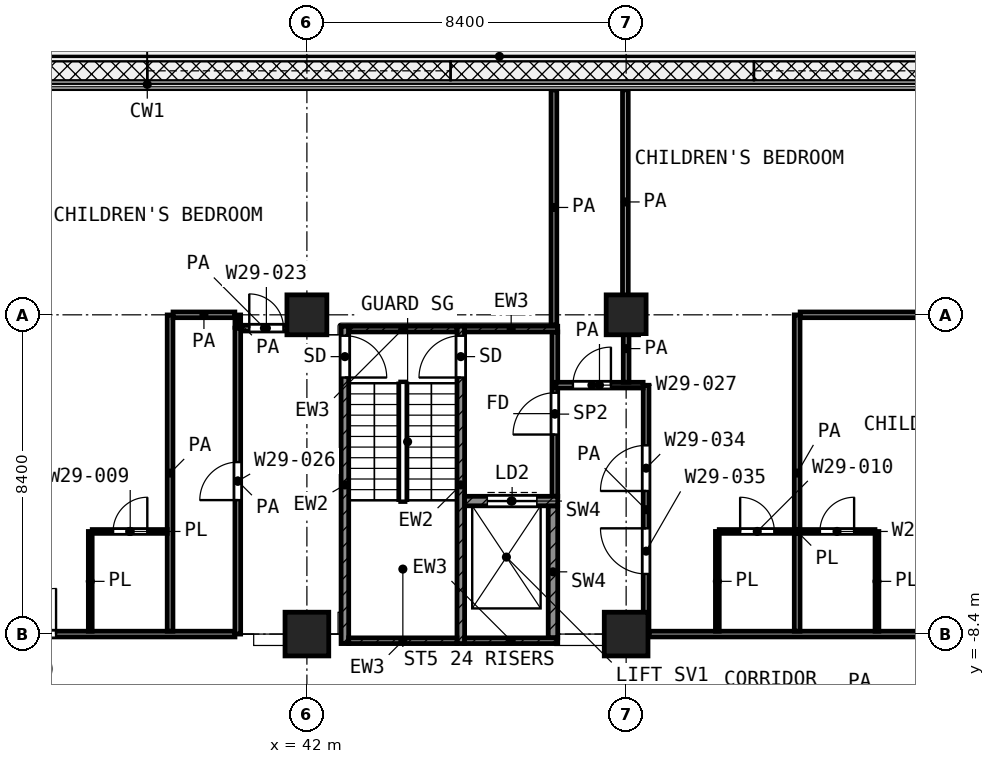
"""IFC4 building model, lengths in metres.
Left out: names, types, materials, properties, quantities, classifications, styles, units other than length and angle.
Written with IfcOpenShell. Run it as: python <this file> out.ifc"""

import sys

from ifc_helpers import new_model, si_unit, direction, frame, frame_2d, origin, origin_2d, place, context, subcontext, project, spatial, rectangle, extrude, element, fill, save


model = new_model("IFC4")
c1 = context("Model", 3, precision=1e-05, world=origin(), true_north=direction((0.0, 1.0)))
c2 = subcontext(c1, "Body", "Model", "MODEL_VIEW")
j1 = project(units=[si_unit("LENGTHUNIT", "METRE"), si_unit("PLANEANGLEUNIT", "RADIAN")], contexts=[c1])
p1 = place(None, origin())
s1 = spatial("IfcSite", under=j1, at=p1, CompositionType="ELEMENT")
p2 = place(p1, origin())
s2 = spatial("IfcBuilding", under=s1, at=p2, CompositionType="ELEMENT")
p3 = place(p2, frame((0.0, 0.0, 149.2)))
s3 = spatial("IfcBuildingStorey", under=s2, at=p3, CompositionType="ELEMENT", Elevation=149.2)
for number, where, z_axis, x_axis in (
    (1, (42.0, 0.0, 0.0), (0.0, 0.0, 1.0), (1.0, 0.0, 0.0)),
    (2, (50.4, 0.0, 0.0), (0.0, 0.0, 1.0), (1.0, 0.0, 0.0)),
):
    element("IfcColumn", number, at=place(p3, frame(where, z_axis=z_axis, x_axis=x_axis)), inside=s3, PredefinedType="COLUMN", context=c2, shape_type="SweptSolid", body=[
        extrude(rectangle(XDim=1.05, YDim=1.05, at=origin_2d()), origin(), (0.0, 0.0, 1.0), 4.2),
    ])
for number, where, z_axis, x_axis in (
    (3, (42.0, -8.4, 0.0), (0.0, 0.0, 1.0), (1.0, 0.0, 0.0)),
    (4, (50.4, -8.4, 0.0), (0.0, 0.0, 1.0), (1.0, 0.0, 0.0)),
):
    element("IfcColumn", number, at=place(p3, frame(where, z_axis=z_axis, x_axis=x_axis)), inside=s3, PredefinedType="COLUMN", context=c2, shape_type="SweptSolid", body=[
        extrude(rectangle(XDim=1.15, YDim=1.15, at=origin_2d()), origin(), (0.0, 0.0, 1.0), 4.2),
    ])
p4 = place(p3, frame((43.0, -8.65, 0.0), z_axis=(0.0, 0.0, 1.0), x_axis=(0.0, 1.0, 0.0)))
e5 = element("IfcWall", 5, at=p4, inside=s3, PredefinedType="SHEAR", context=c2, shape_type="SweptSolid", body=[
    extrude(rectangle(XDim=8.35, YDim=0.2, at=frame_2d((4.175, 0.0))), origin(), (0.0, 0.0, 1.0), 3.7),
])
p5 = place(p4, frame((7.0, 0.0, 0.0)))
e6 = element("IfcOpeningElement", 6, at=p5, cuts=e5, PredefinedType="OPENING", context=c2, shape_type="SweptSolid", body=[
    extrude(rectangle(XDim=1.1, YDim=2.1, at=frame_2d((0.55, 1.05))), frame((0.0, 0.11, 0.0), z_axis=(0.0, -1.0, 0.0), x_axis=(1.0, 0.0, 0.0)), (0.0, 0.0, 1.0), 0.22),
])
p6 = place(p3, frame((46.05, -8.65, 0.0), z_axis=(0.0, 0.0, 1.0), x_axis=(0.0, 1.0, 0.0)))
e7 = element("IfcWall", 7, at=p6, inside=s3, PredefinedType="SHEAR", context=c2, shape_type="SweptSolid", body=[
    extrude(rectangle(XDim=8.35, YDim=0.2, at=frame_2d((4.175, 0.0))), origin(), (0.0, 0.0, 1.0), 3.7),
])
p7 = place(p6, frame((7.0, 0.0, 0.0)))
e8 = element("IfcOpeningElement", 8, at=p7, cuts=e7, PredefinedType="OPENING", context=c2, shape_type="SweptSolid", body=[
    extrude(rectangle(XDim=1.1, YDim=2.1, at=frame_2d((0.55, 1.05))), frame((0.0, 0.11, 0.0), z_axis=(0.0, -1.0, 0.0), x_axis=(1.0, 0.0, 0.0)), (0.0, 0.0, 1.0), 0.22),
])
p8 = place(p3, frame((43.1, -0.375, 0.0), z_axis=(0.0, 0.0, 1.0), x_axis=(1.0, 0.0, 0.0)))
e9 = element("IfcWall", 9, at=p8, inside=s3, PredefinedType="SHEAR", context=c2, shape_type="SweptSolid", body=[
    extrude(rectangle(XDim=2.85, YDim=0.15, at=frame_2d((1.425, 0.0))), origin(), (0.0, 0.0, 1.0), 3.7),
])
p9 = place(p3, frame((46.15, -0.375, 0.0), z_axis=(0.0, 0.0, 1.0), x_axis=(1.0, 0.0, 0.0)))
e10 = element("IfcWall", 10, at=p9, inside=s3, PredefinedType="SHEAR", context=c2, shape_type="SweptSolid", body=[
    extrude(rectangle(XDim=2.45, YDim=0.15, at=frame_2d((1.225, 0.0))), origin(), (0.0, 0.0, 1.0), 3.7),
])
p10 = place(p3, frame((43.1, -8.575, 0.0), z_axis=(0.0, 0.0, 1.0), x_axis=(1.0, 0.0, 0.0)))
e11 = element("IfcWall", 11, at=p10, inside=s3, PredefinedType="SHEAR", context=c2, shape_type="SweptSolid", body=[
    extrude(rectangle(XDim=2.85, YDim=0.15, at=frame_2d((1.425, 0.0))), origin(), (0.0, 0.0, 1.0), 3.7),
])
p11 = place(p3, frame((46.15, -8.575, 0.0), z_axis=(0.0, 0.0, 1.0), x_axis=(1.0, 0.0, 0.0)))
e12 = element("IfcWall", 12, at=p11, inside=s3, PredefinedType="SHEAR", context=c2, shape_type="SweptSolid", body=[
    extrude(rectangle(XDim=2.45, YDim=0.15, at=frame_2d((1.225, 0.0))), origin(), (0.0, 0.0, 1.0), 3.7),
])
p12 = place(p3, frame((46.15, -4.9, 0.0), z_axis=(0.0, 0.0, 1.0), x_axis=(1.0, 0.0, 0.0)))
e13 = element("IfcWall", 13, at=p12, inside=s3, PredefinedType="SHEAR", context=c2, shape_type="SweptSolid", body=[
    extrude(rectangle(XDim=2.45, YDim=0.25, at=frame_2d((1.225, 0.0))), origin(), (0.0, 0.0, 1.0), 3.7),
])
p13 = place(p12, frame((0.6, 0.0, 0.0)))
e14 = element("IfcOpeningElement", 14, at=p13, cuts=e13, PredefinedType="OPENING", context=c2, shape_type="SweptSolid", body=[
    extrude(rectangle(XDim=1.3, YDim=2.1, at=frame_2d((0.65, 1.05))), frame((0.0, 0.135, 0.0), z_axis=(0.0, -1.0, 0.0), x_axis=(1.0, 0.0, 0.0)), (0.0, 0.0, 1.0), 0.27),
])
p14 = place(p3, frame((48.475, -8.5, 0.0), z_axis=(0.0, 0.0, 1.0), x_axis=(0.0, 1.0, 0.0)))
e15 = element("IfcWall", 15, at=p14, inside=s3, PredefinedType="SHEAR", context=c2, shape_type="SweptSolid", body=[
    extrude(rectangle(XDim=3.475, YDim=0.25, at=frame_2d((1.738, 0.0))), origin(), (0.0, 0.0, 1.0), 3.7),
])
p15 = place(p3, frame((48.525, -4.775, 0.0), z_axis=(0.0, 0.0, 1.0), x_axis=(0.0, 1.0, 0.0)))
e16 = element("IfcWall", 16, at=p15, inside=s3, PredefinedType="PARTITIONING", context=c2, shape_type="SweptSolid", body=[
    extrude(rectangle(XDim=4.325, YDim=0.15, at=frame_2d((2.163, 0.0))), origin(), (0.0, 0.0, 1.0), 3.7),
])
p16 = place(p15, frame((1.625, 0.0, 0.0)))
e17 = element("IfcOpeningElement", 17, at=p16, cuts=e16, PredefinedType="OPENING", context=c2, shape_type="SweptSolid", body=[
    extrude(rectangle(XDim=1.1, YDim=2.1, at=frame_2d((0.55, 1.05))), frame((0.0, 0.085, 0.0), z_axis=(0.0, -1.0, 0.0), x_axis=(1.0, 0.0, 0.0)), (0.0, 0.0, 1.0), 0.17),
])
p17 = place(p3, frame((36.352, -5.7, 0.0), z_axis=(0.0, 0.0, 1.0), x_axis=(1.0, 0.0, 0.0)))
e18 = element("IfcWall", 18, at=p17, inside=s3, PredefinedType="PARTITIONING", context=c2, shape_type="SweptSolid", body=[
    extrude(rectangle(XDim=1.973, YDim=0.1, at=frame_2d((0.986, 0.0))), origin(), (0.0, 0.0, 1.0), 3.7),
])
p18 = place(p17, frame((0.549, 0.0, 0.0)))
e19 = element("IfcOpeningElement", 19, at=p18, cuts=e18, PredefinedType="OPENING", context=c2, shape_type="SweptSolid", body=[
    extrude(rectangle(XDim=0.9, YDim=2.1, at=frame_2d((0.45, 1.05))), frame((0.0, 0.06, 0.0), z_axis=(0.0, -1.0, 0.0), x_axis=(1.0, 0.0, 0.0)), (0.0, 0.0, 1.0), 0.12),
])
p19 = place(p3, frame((52.85, -5.7, 0.0), z_axis=(0.0, 0.0, 1.0), x_axis=(1.0, 0.0, 0.0)))
e20 = element("IfcWall", 20, at=p19, inside=s3, PredefinedType="PARTITIONING", context=c2, shape_type="SweptSolid", body=[
    extrude(rectangle(XDim=4.098, YDim=0.1, at=frame_2d((2.049, 0.0))), origin(), (0.0, 0.0, 1.0), 3.7),
])
p20 = place(p19, frame((0.55, 0.0, 0.0)))
e21 = element("IfcOpeningElement", 21, at=p20, cuts=e20, PredefinedType="OPENING", context=c2, shape_type="SweptSolid", body=[
    extrude(rectangle(XDim=0.9, YDim=2.1, at=frame_2d((0.45, 1.05))), frame((0.0, 0.06, 0.0), z_axis=(0.0, -1.0, 0.0), x_axis=(1.0, 0.0, 0.0)), (0.0, 0.0, 1.0), 0.12),
])
p21 = place(p19, frame((2.649, 0.0, 0.0)))
e22 = element("IfcOpeningElement", 22, at=p21, cuts=e20, PredefinedType="OPENING", context=c2, shape_type="SweptSolid", body=[
    extrude(rectangle(XDim=0.9, YDim=2.1, at=frame_2d((0.45, 1.05))), frame((0.0, 0.06, 0.0), z_axis=(0.0, -1.0, 0.0), x_axis=(1.0, 0.0, 0.0)), (0.0, 0.0, 1.0), 0.12),
])
p22 = place(p3, frame((36.3, -8.325, 0.0), z_axis=(0.0, 0.0, 1.0), x_axis=(0.0, 1.0, 0.0)))
e23 = element("IfcWall", 23, at=p22, inside=s3, PredefinedType="PARTITIONING", context=c2, shape_type="SweptSolid", body=[
    extrude(rectangle(XDim=2.624, YDim=0.1, at=frame_2d((1.312, 0.0))), origin(), (0.0, 0.0, 1.0), 3.7),
])
p23 = place(p3, frame((52.8, -8.325, 0.0), z_axis=(0.0, 0.0, 1.0), x_axis=(0.0, 1.0, 0.0)))
e24 = element("IfcWall", 24, at=p23, inside=s3, PredefinedType="PARTITIONING", context=c2, shape_type="SweptSolid", body=[
    extrude(rectangle(XDim=2.625, YDim=0.1, at=frame_2d((1.312, 0.0))), origin(), (0.0, 0.0, 1.0), 3.7),
])
p24 = place(p3, frame((57.0, -8.325, 0.0), z_axis=(0.0, 0.0, 1.0), x_axis=(0.0, 1.0, 0.0)))
e25 = element("IfcWall", 25, at=p24, inside=s3, PredefinedType="PARTITIONING", context=c2, shape_type="SweptSolid", body=[
    extrude(rectangle(XDim=2.624, YDim=0.1, at=frame_2d((1.312, 0.0))), origin(), (0.0, 0.0, 1.0), 3.7),
])
p25 = place(p3, frame((25.0, -8.4, 0.0), z_axis=(0.0, 0.0, 1.0), x_axis=(1.0, 0.0, 0.0)))
e26 = element("IfcWall", 26, at=p25, inside=s3, PredefinedType="PARTITIONING", context=c2, shape_type="SweptSolid", body=[
    extrude(rectangle(XDim=15.107, YDim=0.15, at=frame_2d((7.553, 0.0))), origin(), (0.0, 0.0, 1.0), 3.7),
])
p26 = place(p25, frame((3.65, 0.0, 0.0)))
e27 = element("IfcOpeningElement", 27, at=p26, cuts=e26, PredefinedType="OPENING", context=c2, shape_type="SweptSolid", body=[
    extrude(rectangle(XDim=1.5, YDim=2.1, at=frame_2d((0.75, 1.05))), frame((0.0, 0.085, 0.0), z_axis=(0.0, -1.0, 0.0), x_axis=(1.0, 0.0, 0.0)), (0.0, 0.0, 1.0), 0.17),
])
p27 = place(p25, frame((9.2, 0.0, 0.0)))
e28 = element("IfcOpeningElement", 28, at=p27, cuts=e26, PredefinedType="OPENING", context=c2, shape_type="SweptSolid", body=[
    extrude(rectangle(XDim=1.2, YDim=2.1, at=frame_2d((0.6, 1.05))), frame((0.0, 0.085, 0.0), z_axis=(0.0, -1.0, 0.0), x_axis=(1.0, 0.0, 0.0)), (0.0, 0.0, 1.0), 0.17),
])
p28 = place(p3, frame((51.0, -8.4, 0.0), z_axis=(0.0, 0.0, 1.0), x_axis=(1.0, 0.0, 0.0)))
e29 = element("IfcWall", 29, at=p28, inside=s3, PredefinedType="PARTITIONING", context=c2, shape_type="SweptSolid", body=[
    extrude(rectangle(XDim=24.52, YDim=0.15, at=frame_2d((12.26, 0.0))), origin(), (0.0, 0.0, 1.0), 3.7),
])
p29 = place(p28, frame((8.4, 0.0, 0.0)))
e30 = element("IfcOpeningElement", 30, at=p29, cuts=e29, PredefinedType="OPENING", context=c2, shape_type="SweptSolid", body=[
    extrude(rectangle(XDim=1.2, YDim=2.1, at=frame_2d((0.6, 1.05))), frame((0.0, 0.085, 0.0), z_axis=(0.0, -1.0, 0.0), x_axis=(1.0, 0.0, 0.0)), (0.0, 0.0, 1.0), 0.17),
])
p30 = place(p28, frame((10.0, 0.0, 0.0)))
e31 = element("IfcOpeningElement", 31, at=p30, cuts=e29, PredefinedType="OPENING", context=c2, shape_type="SweptSolid", body=[
    extrude(rectangle(XDim=1.2, YDim=2.1, at=frame_2d((0.6, 1.05))), frame((0.0, 0.085, 0.0), z_axis=(0.0, -1.0, 0.0), x_axis=(1.0, 0.0, 0.0)), (0.0, 0.0, 1.0), 0.17),
])
p31 = place(p28, frame((13.8, 0.0, 0.0)))
e32 = element("IfcOpeningElement", 32, at=p31, cuts=e29, PredefinedType="OPENING", context=c2, shape_type="SweptSolid", body=[
    extrude(rectangle(XDim=1.2, YDim=2.1, at=frame_2d((0.6, 1.05))), frame((0.0, 0.085, 0.0), z_axis=(0.0, -1.0, 0.0), x_axis=(1.0, 0.0, 0.0)), (0.0, 0.0, 1.0), 0.17),
])
p32 = place(p28, frame((16.8, 0.0, 0.0)))
e33 = element("IfcOpeningElement", 33, at=p32, cuts=e29, PredefinedType="OPENING", context=c2, shape_type="SweptSolid", body=[
    extrude(rectangle(XDim=1.2, YDim=2.1, at=frame_2d((0.6, 1.05))), frame((0.0, 0.085, 0.0), z_axis=(0.0, -1.0, 0.0), x_axis=(1.0, 0.0, 0.0)), (0.0, 0.0, 1.0), 0.17),
])
p33 = place(p28, frame((22.0, 0.0, 0.0)))
e34 = element("IfcOpeningElement", 34, at=p33, cuts=e29, PredefinedType="OPENING", context=c2, shape_type="SweptSolid", body=[
    extrude(rectangle(XDim=1.0, YDim=2.1, at=frame_2d((0.5, 1.05))), frame((0.0, 0.085, 0.0), z_axis=(0.0, -1.0, 0.0), x_axis=(1.0, 0.0, 0.0)), (0.0, 0.0, 1.0), 0.17),
])
p34 = place(p3, frame((48.55, -1.85, 0.0), z_axis=(0.0, 0.0, 1.0), x_axis=(1.0, 0.0, 0.0)))
e35 = element("IfcWall", 35, at=p34, inside=s3, PredefinedType="PARTITIONING", context=c2, shape_type="SweptSolid", body=[
    extrude(rectangle(XDim=2.297, YDim=0.15, at=frame_2d((1.148, 0.0))), origin(), (0.0, 0.0, 1.0), 3.7),
])
p35 = place(p34, frame((0.45, 0.0, 0.0)))
e36 = element("IfcOpeningElement", 36, at=p35, cuts=e35, PredefinedType="OPENING", context=c2, shape_type="SweptSolid", body=[
    extrude(rectangle(XDim=1.0, YDim=2.1, at=frame_2d((0.5, 1.05))), frame((0.0, 0.085, 0.0), z_axis=(0.0, -1.0, 0.0), x_axis=(1.0, 0.0, 0.0)), (0.0, 0.0, 1.0), 0.17),
])
p36 = place(p3, frame((40.277, -0.35, 0.0), z_axis=(0.0, 0.0, 1.0), x_axis=(1.0, 0.0, 0.0)))
e37 = element("IfcWall", 37, at=p36, inside=s3, PredefinedType="PARTITIONING", context=c2, shape_type="SweptSolid", body=[
    extrude(rectangle(XDim=1.211, YDim=0.15, at=frame_2d((0.605, 0.0))), origin(), (0.0, 0.0, 1.0), 3.7),
])
p37 = place(p36, frame((0.207, 0.0, 0.0)))
e38 = element("IfcOpeningElement", 38, at=p37, cuts=e37, PredefinedType="OPENING", context=c2, shape_type="SweptSolid", body=[
    extrude(rectangle(XDim=0.9, YDim=2.1, at=frame_2d((0.45, 1.05))), frame((0.0, 0.085, 0.0), z_axis=(0.0, -1.0, 0.0), x_axis=(1.0, 0.0, 0.0)), (0.0, 0.0, 1.0), 0.17),
])
p38 = place(p3, frame((38.478, 0.0, 0.0), z_axis=(0.0, 0.0, 1.0), x_axis=(1.0, 0.0, 0.0)))
e39 = element("IfcWall", 39, at=p38, inside=s3, PredefinedType="PARTITIONING", context=c2, shape_type="SweptSolid", body=[
    extrude(rectangle(XDim=1.626, YDim=0.15, at=frame_2d((0.813, 0.0))), origin(), (0.0, 0.0, 1.0), 3.7),
])
p39 = place(p3, frame((54.979, 0.0, 0.0), z_axis=(0.0, 0.0, 1.0), x_axis=(1.0, 0.0, 0.0)))
e40 = element("IfcWall", 40, at=p39, inside=s3, PredefinedType="PARTITIONING", context=c2, shape_type="SweptSolid", body=[
    extrude(rectangle(XDim=7.346, YDim=0.15, at=frame_2d((3.673, 0.0))), origin(), (0.0, 0.0, 1.0), 3.7),
])
p40 = place(p3, frame((38.4, -8.325, 0.0), z_axis=(0.0, 0.0, 1.0), x_axis=(0.0, 1.0, 0.0)))
e41 = element("IfcWall", 41, at=p40, inside=s3, PredefinedType="PARTITIONING", context=c2, shape_type="SweptSolid", body=[
    extrude(rectangle(XDim=8.322, YDim=0.15, at=frame_2d((4.161, 0.0))), origin(), (0.0, 0.0, 1.0), 3.7),
])
p41 = place(p3, frame((40.182, -8.4, 0.0), z_axis=(0.0, 0.0, 1.0), x_axis=(0.0, 1.0, 0.0)))
e42 = element("IfcWall", 42, at=p41, inside=s3, PredefinedType="PARTITIONING", context=c2, shape_type="SweptSolid", body=[
    extrude(rectangle(XDim=8.05, YDim=0.15, at=frame_2d((4.025, 0.0))), origin(), (0.0, 0.0, 1.0), 3.7),
])
p42 = place(p41, frame((3.525, 0.0, 0.0)))
e43 = element("IfcOpeningElement", 43, at=p42, cuts=e42, PredefinedType="OPENING", context=c2, shape_type="SweptSolid", body=[
    extrude(rectangle(XDim=1.0, YDim=2.1, at=frame_2d((0.5, 1.05))), frame((0.0, 0.085, 0.0), z_axis=(0.0, -1.0, 0.0), x_axis=(1.0, 0.0, 0.0)), (0.0, 0.0, 1.0), 0.17),
])
p43 = place(p3, frame((40.182, -0.33, 0.0), z_axis=(0.0, 0.0, 1.0), x_axis=(0.0, 1.0, 0.0)))
e44 = element("IfcWall", 44, at=p43, inside=s3, PredefinedType="PARTITIONING", context=c2, shape_type="SweptSolid", body=[
    extrude(rectangle(XDim=0.327, YDim=0.15, at=frame_2d((0.164, 0.0))), origin(), (0.0, 0.0, 1.0), 3.7),
])
p44 = place(p3, frame((48.5, -0.27, 0.0), z_axis=(0.0, 0.0, 1.0), x_axis=(0.0, 1.0, 0.0)))
e45 = element("IfcWall", 45, at=p44, inside=s3, PredefinedType="PARTITIONING", context=c2, shape_type="SweptSolid", body=[
    extrude(rectangle(XDim=6.19, YDim=0.15, at=frame_2d((3.095, 0.0))), origin(), (0.0, 0.0, 1.0), 3.7),
])
p45 = place(p3, frame((50.38, 0.02, 0.0), z_axis=(0.0, 0.0, 1.0), x_axis=(0.0, 1.0, 0.0)))
e46 = element("IfcWall", 46, at=p45, inside=s3, PredefinedType="PARTITIONING", context=c2, shape_type="SweptSolid", body=[
    extrude(rectangle(XDim=5.9, YDim=0.15, at=frame_2d((2.95, 0.0))), origin(), (0.0, 0.0, 1.0), 3.7),
])
p46 = place(p3, frame((50.4, -1.775, 0.0), z_axis=(0.0, 0.0, 1.0), x_axis=(0.0, 1.0, 0.0)))
e47 = element("IfcWall", 47, at=p46, inside=s3, PredefinedType="PARTITIONING", context=c2, shape_type="SweptSolid", body=[
    extrude(rectangle(XDim=1.772, YDim=0.15, at=frame_2d((0.886, 0.0))), origin(), (0.0, 0.0, 1.0), 3.7),
])
p47 = place(p3, frame((50.925, -8.4, 0.0), z_axis=(0.0, 0.0, 1.0), x_axis=(0.0, 1.0, 0.0)))
e48 = element("IfcWall", 48, at=p47, inside=s3, PredefinedType="PARTITIONING", context=c2, shape_type="SweptSolid", body=[
    extrude(rectangle(XDim=6.547, YDim=0.15, at=frame_2d((3.273, 0.0))), origin(), (0.0, 0.0, 1.0), 3.7),
])
p48 = place(p47, frame((3.765, 0.0, 0.0)))
e49 = element("IfcOpeningElement", 49, at=p48, cuts=e48, PredefinedType="OPENING", context=c2, shape_type="SweptSolid", body=[
    extrude(rectangle(XDim=1.2, YDim=2.1, at=frame_2d((0.6, 1.05))), frame((0.0, 0.085, 0.0), z_axis=(0.0, -1.0, 0.0), x_axis=(1.0, 0.0, 0.0)), (0.0, 0.0, 1.0), 0.17),
])
p49 = place(p47, frame((1.582, 0.0, 0.0)))
e50 = element("IfcOpeningElement", 50, at=p49, cuts=e48, PredefinedType="OPENING", context=c2, shape_type="SweptSolid", body=[
    extrude(rectangle(XDim=1.2, YDim=2.1, at=frame_2d((0.6, 1.05))), frame((0.0, 0.085, 0.0), z_axis=(0.0, -1.0, 0.0), x_axis=(1.0, 0.0, 0.0)), (0.0, 0.0, 1.0), 0.17),
])
p50 = place(p3, frame((54.9, -8.325, 0.0), z_axis=(0.0, 0.0, 1.0), x_axis=(0.0, 1.0, 0.0)))
e51 = element("IfcWall", 51, at=p50, inside=s3, PredefinedType="PARTITIONING", context=c2, shape_type="SweptSolid", body=[
    extrude(rectangle(XDim=8.323, YDim=0.15, at=frame_2d((4.162, 0.0))), origin(), (0.0, 0.0, 1.0), 3.7),
])
p51 = place(p5, frame((1.1, 0.0, 0.0), z_axis=(0.0, 0.0, 1.0), x_axis=(-1.0, 0.0, 0.0)))
e52 = element("IfcDoor", 52, at=p51, inside=s3, OperationType="SINGLE_SWING_LEFT", PredefinedType="DOOR", context=c2, shape_type="SweptSolid", body=[
    extrude(rectangle(XDim=1.1, YDim=2.1, at=frame_2d((0.55, 1.05))), frame((0.0, 0.025, 0.0), z_axis=(0.0, -1.0, 0.0), x_axis=(1.0, 0.0, 0.0)), (0.0, 0.0, 1.0), 0.05),
])
fill(e6, e52)
p52 = place(p7, origin())
e53 = element("IfcDoor", 53, at=p52, inside=s3, OperationType="SINGLE_SWING_LEFT", PredefinedType="DOOR", context=c2, shape_type="SweptSolid", body=[
    extrude(rectangle(XDim=1.1, YDim=2.1, at=frame_2d((0.55, 1.05))), frame((0.0, 0.025, 0.0), z_axis=(0.0, -1.0, 0.0), x_axis=(1.0, 0.0, 0.0)), (0.0, 0.0, 1.0), 0.05),
])
fill(e8, e53)
p53 = place(p13, origin())
e54 = element("IfcDoor", 54, at=p53, inside=s3, OperationType="DOUBLE_DOOR_SLIDING", PredefinedType="DOOR", context=c2, shape_type="SweptSolid", body=[
    extrude(rectangle(XDim=1.3, YDim=2.1, at=frame_2d((0.65, 1.05))), frame((0.0, 0.025, 0.0), z_axis=(0.0, -1.0, 0.0), x_axis=(1.0, 0.0, 0.0)), (0.0, 0.0, 1.0), 0.05),
])
fill(e14, e54)
p54 = place(p16, origin())
e55 = element("IfcDoor", 55, at=p54, inside=s3, OperationType="SINGLE_SWING_LEFT", PredefinedType="DOOR", context=c2, shape_type="SweptSolid", body=[
    extrude(rectangle(XDim=1.1, YDim=2.1, at=frame_2d((0.55, 1.05))), frame((0.0, 0.025, 0.0), z_axis=(0.0, -1.0, 0.0), x_axis=(1.0, 0.0, 0.0)), (0.0, 0.0, 1.0), 0.05),
])
fill(e17, e55)
p55 = place(p27, origin())
e56 = element("IfcDoor", 56, at=p55, inside=s3, OperationType="SINGLE_SWING_RIGHT", PredefinedType="DOOR", context=c2, shape_type="SweptSolid", body=[
    extrude(rectangle(XDim=1.2, YDim=2.1, at=frame_2d((0.6, 1.05))), frame((0.0, 0.025, 0.0), z_axis=(0.0, -1.0, 0.0), x_axis=(1.0, 0.0, 0.0)), (0.0, 0.0, 1.0), 0.05),
])
fill(e28, e56)
p56 = place(p37, origin())
e57 = element("IfcDoor", 57, at=p56, inside=s3, OperationType="SINGLE_SWING_LEFT", PredefinedType="DOOR", context=c2, shape_type="SweptSolid", body=[
    extrude(rectangle(XDim=0.9, YDim=2.1, at=frame_2d((0.45, 1.05))), frame((0.0, 0.025, 0.0), z_axis=(0.0, -1.0, 0.0), x_axis=(1.0, 0.0, 0.0)), (0.0, 0.0, 1.0), 0.05),
])
fill(e38, e57)
p57 = place(p18, origin())
e58 = element("IfcDoor", 58, at=p57, inside=s3, OperationType="SINGLE_SWING_RIGHT", PredefinedType="DOOR", context=c2, shape_type="SweptSolid", body=[
    extrude(rectangle(XDim=0.9, YDim=2.1, at=frame_2d((0.45, 1.05))), frame((0.0, 0.025, 0.0), z_axis=(0.0, -1.0, 0.0), x_axis=(1.0, 0.0, 0.0)), (0.0, 0.0, 1.0), 0.05),
])
fill(e19, e58)
p58 = place(p42, origin())
e59 = element("IfcDoor", 59, at=p58, inside=s3, OperationType="SINGLE_SWING_LEFT", PredefinedType="DOOR", context=c2, shape_type="SweptSolid", body=[
    extrude(rectangle(XDim=1.0, YDim=2.1, at=frame_2d((0.5, 1.05))), frame((0.0, 0.025, 0.0), z_axis=(0.0, -1.0, 0.0), x_axis=(1.0, 0.0, 0.0)), (0.0, 0.0, 1.0), 0.05),
])
fill(e43, e59)
p59 = place(p35, origin())
e60 = element("IfcDoor", 60, at=p59, inside=s3, OperationType="SINGLE_SWING_RIGHT", PredefinedType="DOOR", context=c2, shape_type="SweptSolid", body=[
    extrude(rectangle(XDim=1.0, YDim=2.1, at=frame_2d((0.5, 1.05))), frame((0.0, 0.025, 0.0), z_axis=(0.0, -1.0, 0.0), x_axis=(1.0, 0.0, 0.0)), (0.0, 0.0, 1.0), 0.05),
])
fill(e36, e60)
p60 = place(p48, origin())
e61 = element("IfcDoor", 61, at=p60, inside=s3, OperationType="SINGLE_SWING_LEFT", PredefinedType="DOOR", context=c2, shape_type="SweptSolid", body=[
    extrude(rectangle(XDim=1.2, YDim=2.1, at=frame_2d((0.6, 1.05))), frame((0.0, 0.025, 0.0), z_axis=(0.0, -1.0, 0.0), x_axis=(1.0, 0.0, 0.0)), (0.0, 0.0, 1.0), 0.05),
])
fill(e49, e61)
p61 = place(p49, origin())
e62 = element("IfcDoor", 62, at=p61, inside=s3, OperationType="SINGLE_SWING_RIGHT", PredefinedType="DOOR", context=c2, shape_type="SweptSolid", body=[
    extrude(rectangle(XDim=1.2, YDim=2.1, at=frame_2d((0.6, 1.05))), frame((0.0, 0.025, 0.0), z_axis=(0.0, -1.0, 0.0), x_axis=(1.0, 0.0, 0.0)), (0.0, 0.0, 1.0), 0.05),
])
fill(e50, e62)
p62 = place(p20, origin())
e63 = element("IfcDoor", 63, at=p62, inside=s3, OperationType="SINGLE_SWING_LEFT", PredefinedType="DOOR", context=c2, shape_type="SweptSolid", body=[
    extrude(rectangle(XDim=0.9, YDim=2.1, at=frame_2d((0.45, 1.05))), frame((0.0, 0.025, 0.0), z_axis=(0.0, -1.0, 0.0), x_axis=(1.0, 0.0, 0.0)), (0.0, 0.0, 1.0), 0.05),
])
fill(e21, e63)
p63 = place(p21, origin())
e64 = element("IfcDoor", 64, at=p63, inside=s3, OperationType="SINGLE_SWING_RIGHT", PredefinedType="DOOR", context=c2, shape_type="SweptSolid", body=[
    extrude(rectangle(XDim=0.9, YDim=2.1, at=frame_2d((0.45, 1.05))), frame((0.0, 0.025, 0.0), z_axis=(0.0, -1.0, 0.0), x_axis=(1.0, 0.0, 0.0)), (0.0, 0.0, 1.0), 0.05),
])
fill(e22, e64)
save(model, sys.argv[1])
